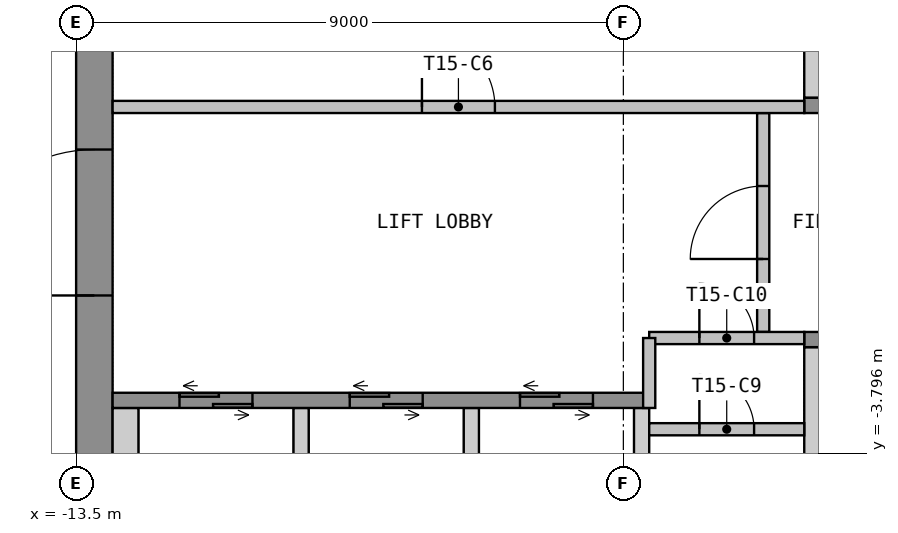
"""IFC4 building model, lengths in metres.
Left out: names, types, materials, properties, quantities, classifications, styles, units other than length and angle.
Written with IfcOpenShell. Run it as: python <this file> out.ifc"""

import sys

from ifc_helpers import new_model, si_unit, direction, frame, frame_2d, origin, place, context, subcontext, project, spatial, polyline, rectangle, outline, extrude, element, fill, save


model = new_model("IFC4")
c1 = context("Model", 3, precision=1e-05, world=origin(), true_north=direction((0.0, 1.0)))
c2 = subcontext(c1, "Body", "Model", "MODEL_VIEW")
j1 = project(units=[si_unit("LENGTHUNIT", "METRE"), si_unit("PLANEANGLEUNIT", "RADIAN")], contexts=[c1])
p1 = place(None, origin())
s1 = spatial("IfcSite", under=j1, at=p1, CompositionType="ELEMENT")
p2 = place(p1, origin())
s2 = spatial("IfcBuilding", under=s1, at=p2, CompositionType="ELEMENT")
p3 = place(p2, frame((0.0, 0.0, 207.3)))
s3 = spatial("IfcBuildingStorey", under=s2, at=p3, CompositionType="ELEMENT", Elevation=207.3)
p4 = place(p3, frame((-13.2, -10.65, 0.0), z_axis=(0.0, 0.0, 1.0), x_axis=(0.0, 1.0, 0.0)))
e1 = element("IfcWall", 1, at=p4, inside=s3, PredefinedType="SHEAR", context=c2, shape_type="SweptSolid", body=[
    extrude(rectangle(XDim=21.3, YDim=0.6, at=frame_2d((10.65, 0.0))), origin(), (0.0, 0.0, 1.0), 3.55),
])
p5 = place(p4, frame((9.45, 0.0, 0.0)))
e2 = element("IfcOpeningElement", 2, at=p5, cuts=e1, PredefinedType="OPENING", context=c2, shape_type="SweptSolid", body=[
    extrude(rectangle(XDim=2.4, YDim=2.1, at=frame_2d((1.2, 1.05))), frame((0.0, 0.31, 0.0), z_axis=(0.0, -1.0, 0.0), x_axis=(1.0, 0.0, 0.0)), (0.0, 0.0, 1.0), 0.62),
])
p6 = place(p3, origin())
e3 = element("IfcWall", 3, at=p6, inside=s3, PredefinedType="SHEAR", context=c2, shape_type="SweptSolid", body=[
    extrude(outline(polyline([(-1.525, 2.05), (-1.275, 2.05), (-1.275, 4.75), (-1.525, 4.75), (-1.525, 2.05)])), origin(), (0.0, 0.0, 1.0), 3.55),
])
p7 = place(p3, frame((-1.525, 1.925, 0.0), z_axis=(0.0, 0.0, 1.0), x_axis=(1.0, 0.0, 0.0)))
e4 = element("IfcWall", 4, at=p7, inside=s3, PredefinedType="SHEAR", context=c2, shape_type="SweptSolid", body=[
    extrude(rectangle(XDim=3.05, YDim=0.25, at=frame_2d((1.525, 0.0))), origin(), (0.0, 0.0, 1.0), 3.55),
])
p8 = place(p7, frame((0.925, 0.0, 0.0)))
e5 = element("IfcOpeningElement", 5, at=p8, cuts=e4, PredefinedType="OPENING", context=c2, shape_type="SweptSolid", body=[
    extrude(rectangle(XDim=1.2, YDim=2.1, at=frame_2d((0.6, 1.05))), frame((0.0, 0.135, 0.0), z_axis=(0.0, -1.0, 0.0), x_axis=(1.0, 0.0, 0.0)), (0.0, 0.0, 1.0), 0.27),
])
p9 = place(p3, origin())
e6 = element("IfcWall", 6, at=p9, inside=s3, PredefinedType="SHEAR", context=c2, shape_type="SweptSolid", body=[
    extrude(outline(polyline([(-12.9, -4.75), (-12.475, -4.75), (-12.475, -3.05), (-12.9, -3.05), (-12.9, -4.75)])), origin(), (0.0, 0.0, 1.0), 3.55),
])
p10 = place(p3, origin())
e7 = element("IfcWall", 7, at=p10, inside=s3, PredefinedType="SHEAR", context=c2, shape_type="SweptSolid", body=[
    extrude(outline(polyline([(-9.925, -4.75), (-9.675, -4.75), (-9.675, -3.05), (-9.925, -3.05), (-9.925, -4.75)])), origin(), (0.0, 0.0, 1.0), 3.55),
])
p11 = place(p3, origin())
e8 = element("IfcWall", 8, at=p11, inside=s3, PredefinedType="SHEAR", context=c2, shape_type="SweptSolid", body=[
    extrude(outline(polyline([(-7.125, -4.75), (-6.875, -4.75), (-6.875, -3.05), (-7.125, -3.05), (-7.125, -4.75)])), origin(), (0.0, 0.0, 1.0), 3.55),
])
p12 = place(p3, origin())
e9 = element("IfcWall", 9, at=p12, inside=s3, PredefinedType="SHEAR", context=c2, shape_type="SweptSolid", body=[
    extrude(outline(polyline([(-4.325, -4.75), (-4.075, -4.75), (-4.075, -3.05), (-4.325, -3.05), (-4.325, -4.75)])), origin(), (0.0, 0.0, 1.0), 3.55),
])
p13 = place(p3, origin())
e10 = element("IfcWall", 10, at=p13, inside=s3, PredefinedType="SHEAR", context=c2, shape_type="SweptSolid", body=[
    extrude(outline(polyline([(-1.525, -4.75), (-1.275, -4.75), (-1.275, -2.05), (-1.525, -2.05), (-1.525, -4.75)])), origin(), (0.0, 0.0, 1.0), 3.55),
])
p14 = place(p3, frame((-12.9, -2.925, 0.0), z_axis=(0.0, 0.0, 1.0), x_axis=(1.0, 0.0, 0.0)))
e11 = element("IfcWall", 11, at=p14, inside=s3, PredefinedType="SHEAR", context=c2, shape_type="SweptSolid", body=[
    extrude(rectangle(XDim=8.825, YDim=0.25, at=frame_2d((4.413, 0.0))), origin(), (0.0, 0.0, 1.0), 3.55),
])
p15 = place(p14, frame((1.1, 0.0, 0.0)))
e12 = element("IfcOpeningElement", 12, at=p15, cuts=e11, PredefinedType="OPENING", context=c2, shape_type="SweptSolid", body=[
    extrude(rectangle(XDim=1.2, YDim=2.1, at=frame_2d((0.6, 1.05))), frame((0.0, 0.135, 0.0), z_axis=(0.0, -1.0, 0.0), x_axis=(1.0, 0.0, 0.0)), (0.0, 0.0, 1.0), 0.27),
])
p16 = place(p14, frame((3.9, 0.0, 0.0)))
e13 = element("IfcOpeningElement", 13, at=p16, cuts=e11, PredefinedType="OPENING", context=c2, shape_type="SweptSolid", body=[
    extrude(rectangle(XDim=1.2, YDim=2.1, at=frame_2d((0.6, 1.05))), frame((0.0, 0.135, 0.0), z_axis=(0.0, -1.0, 0.0), x_axis=(1.0, 0.0, 0.0)), (0.0, 0.0, 1.0), 0.27),
])
p17 = place(p14, frame((6.7, 0.0, 0.0)))
e14 = element("IfcOpeningElement", 14, at=p17, cuts=e11, PredefinedType="OPENING", context=c2, shape_type="SweptSolid", body=[
    extrude(rectangle(XDim=1.2, YDim=2.1, at=frame_2d((0.6, 1.05))), frame((0.0, 0.135, 0.0), z_axis=(0.0, -1.0, 0.0), x_axis=(1.0, 0.0, 0.0)), (0.0, 0.0, 1.0), 0.27),
])
p18 = place(p3, frame((-1.525, -1.925, 0.0), z_axis=(0.0, 0.0, 1.0), x_axis=(1.0, 0.0, 0.0)))
e15 = element("IfcWall", 15, at=p18, inside=s3, PredefinedType="SHEAR", context=c2, shape_type="SweptSolid", body=[
    extrude(rectangle(XDim=14.425, YDim=0.25, at=frame_2d((7.212, 0.0))), origin(), (0.0, 0.0, 1.0), 3.55),
])
p19 = place(p18, frame((0.925, 0.0, 0.0)))
e16 = element("IfcOpeningElement", 16, at=p19, cuts=e15, PredefinedType="OPENING", context=c2, shape_type="SweptSolid", body=[
    extrude(rectangle(XDim=1.2, YDim=2.1, at=frame_2d((0.6, 1.05))), frame((0.0, 0.135, 0.0), z_axis=(0.0, -1.0, 0.0), x_axis=(1.0, 0.0, 0.0)), (0.0, 0.0, 1.0), 0.27),
])
p20 = place(p18, frame((3.725, 0.0, 0.0)))
e17 = element("IfcOpeningElement", 17, at=p20, cuts=e15, PredefinedType="OPENING", context=c2, shape_type="SweptSolid", body=[
    extrude(rectangle(XDim=1.2, YDim=2.1, at=frame_2d((0.6, 1.05))), frame((0.0, 0.135, 0.0), z_axis=(0.0, -1.0, 0.0), x_axis=(1.0, 0.0, 0.0)), (0.0, 0.0, 1.0), 0.27),
])
p21 = place(p3, frame((-2.2, -1.8, 0.0), z_axis=(0.0, 0.0, 1.0), x_axis=(0.0, 1.0, 0.0)))
e18 = element("IfcWall", 18, at=p21, inside=s3, PredefinedType="PARTITIONING", context=c2, shape_type="SweptSolid", body=[
    extrude(rectangle(XDim=3.6, YDim=0.2, at=frame_2d((1.8, 0.0))), origin(), (0.0, 0.0, 1.0), 3.55),
])
p22 = place(p21, frame((1.2, 0.0, 0.0)))
e19 = element("IfcOpeningElement", 19, at=p22, cuts=e18, PredefinedType="OPENING", context=c2, shape_type="SweptSolid", body=[
    extrude(rectangle(XDim=1.2, YDim=2.1, at=frame_2d((0.6, 1.05))), frame((0.0, 0.11, 0.0), z_axis=(0.0, -1.0, 0.0), x_axis=(1.0, 0.0, 0.0)), (0.0, 0.0, 1.0), 0.22),
])
p23 = place(p3, frame((-12.9, 1.9, 0.0), z_axis=(0.0, 0.0, 1.0), x_axis=(1.0, 0.0, 0.0)))
e20 = element("IfcWall", 20, at=p23, inside=s3, PredefinedType="PARTITIONING", context=c2, shape_type="SweptSolid", body=[
    extrude(rectangle(XDim=11.375, YDim=0.2, at=frame_2d((5.688, 0.0))), origin(), (0.0, 0.0, 1.0), 3.55),
])
p24 = place(p23, frame((5.087, 0.0, 0.0)))
e21 = element("IfcOpeningElement", 21, at=p24, cuts=e20, PredefinedType="OPENING", context=c2, shape_type="SweptSolid", body=[
    extrude(rectangle(XDim=1.2, YDim=2.1, at=frame_2d((0.6, 1.05))), frame((0.0, 0.11, 0.0), z_axis=(0.0, -1.0, 0.0), x_axis=(1.0, 0.0, 0.0)), (0.0, 0.0, 1.0), 0.22),
])
p25 = place(p3, frame((-4.075, -3.4, 0.0), z_axis=(0.0, 0.0, 1.0), x_axis=(1.0, 0.0, 0.0)))
e22 = element("IfcWall", 22, at=p25, inside=s3, PredefinedType="PARTITIONING", context=c2, shape_type="SweptSolid", body=[
    extrude(rectangle(XDim=2.55, YDim=0.2, at=frame_2d((1.275, 0.0))), origin(), (0.0, 0.0, 1.0), 3.55),
])
p26 = place(p25, frame((0.825, 0.0, 0.0)))
e23 = element("IfcOpeningElement", 23, at=p26, cuts=e22, PredefinedType="OPENING", context=c2, shape_type="SweptSolid", body=[
    extrude(rectangle(XDim=0.9, YDim=2.1, at=frame_2d((0.45, 1.05))), frame((0.0, 0.11, 0.0), z_axis=(0.0, -1.0, 0.0), x_axis=(1.0, 0.0, 0.0)), (0.0, 0.0, 1.0), 0.22),
])
p27 = place(p3, frame((-4.075, -1.9, 0.0), z_axis=(0.0, 0.0, 1.0), x_axis=(1.0, 0.0, 0.0)))
e24 = element("IfcWall", 24, at=p27, inside=s3, PredefinedType="PARTITIONING", context=c2, shape_type="SweptSolid", body=[
    extrude(rectangle(XDim=2.55, YDim=0.2, at=frame_2d((1.275, 0.0))), origin(), (0.0, 0.0, 1.0), 3.55),
])
p28 = place(p27, frame((0.825, 0.0, 0.0)))
e25 = element("IfcOpeningElement", 25, at=p28, cuts=e24, PredefinedType="OPENING", context=c2, shape_type="SweptSolid", body=[
    extrude(rectangle(XDim=0.9, YDim=2.1, at=frame_2d((0.45, 1.05))), frame((0.0, 0.11, 0.0), z_axis=(0.0, -1.0, 0.0), x_axis=(1.0, 0.0, 0.0)), (0.0, 0.0, 1.0), 0.22),
])
p29 = place(p3, frame((-4.075, -1.9, 0.0), z_axis=(0.0, 0.0, 1.0), x_axis=(0.0, -1.0, 0.0)))
e26 = element("IfcWall", 26, at=p29, inside=s3, PredefinedType="PARTITIONING", context=c2, shape_type="SweptSolid", body=[
    extrude(rectangle(XDim=1.15, YDim=0.2, at=frame_2d((0.575, 0.0))), origin(), (0.0, 0.0, 1.0), 3.55),
])
p30 = place(p5, origin())
e27 = element("IfcDoor", 27, at=p30, inside=s3, OperationType="DOUBLE_DOOR_DOUBLE_SWING", PredefinedType="DOOR", context=c2, shape_type="SweptSolid", body=[
    extrude(rectangle(XDim=2.4, YDim=2.1, at=frame_2d((1.2, 1.05))), frame((0.0, 0.025, 0.0), z_axis=(0.0, -1.0, 0.0), x_axis=(1.0, 0.0, 0.0)), (0.0, 0.0, 1.0), 0.05),
])
fill(e2, e27)
p31 = place(p15, origin())
e28 = element("IfcDoor", 28, at=p31, inside=s3, OperationType="DOUBLE_DOOR_SLIDING", PredefinedType="DOOR", context=c2, shape_type="SweptSolid", body=[
    extrude(rectangle(XDim=1.2, YDim=2.1, at=frame_2d((0.6, 1.05))), frame((0.0, 0.025, 0.0), z_axis=(0.0, -1.0, 0.0), x_axis=(1.0, 0.0, 0.0)), (0.0, 0.0, 1.0), 0.05),
])
fill(e12, e28)
p32 = place(p16, origin())
e29 = element("IfcDoor", 29, at=p32, inside=s3, OperationType="DOUBLE_DOOR_SLIDING", PredefinedType="DOOR", context=c2, shape_type="SweptSolid", body=[
    extrude(rectangle(XDim=1.2, YDim=2.1, at=frame_2d((0.6, 1.05))), frame((0.0, 0.025, 0.0), z_axis=(0.0, -1.0, 0.0), x_axis=(1.0, 0.0, 0.0)), (0.0, 0.0, 1.0), 0.05),
])
fill(e13, e29)
p33 = place(p17, origin())
e30 = element("IfcDoor", 30, at=p33, inside=s3, OperationType="DOUBLE_DOOR_SLIDING", PredefinedType="DOOR", context=c2, shape_type="SweptSolid", body=[
    extrude(rectangle(XDim=1.2, YDim=2.1, at=frame_2d((0.6, 1.05))), frame((0.0, 0.025, 0.0), z_axis=(0.0, -1.0, 0.0), x_axis=(1.0, 0.0, 0.0)), (0.0, 0.0, 1.0), 0.05),
])
fill(e14, e30)
p34 = place(p22, origin())
e31 = element("IfcDoor", 31, at=p34, inside=s3, OperationType="SINGLE_SWING_LEFT", PredefinedType="DOOR", context=c2, shape_type="SweptSolid", body=[
    extrude(rectangle(XDim=1.2, YDim=2.1, at=frame_2d((0.6, 1.05))), frame((0.0, 0.025, 0.0), z_axis=(0.0, -1.0, 0.0), x_axis=(1.0, 0.0, 0.0)), (0.0, 0.0, 1.0), 0.05),
])
fill(e19, e31)
p35 = place(p24, origin())
e32 = element("IfcDoor", 32, at=p35, inside=s3, OperationType="SINGLE_SWING_RIGHT", PredefinedType="DOOR", context=c2, shape_type="SweptSolid", body=[
    extrude(rectangle(XDim=1.2, YDim=2.1, at=frame_2d((0.6, 1.05))), frame((0.0, 0.025, 0.0), z_axis=(0.0, -1.0, 0.0), x_axis=(1.0, 0.0, 0.0)), (0.0, 0.0, 1.0), 0.05),
])
fill(e21, e32)
p36 = place(p26, origin())
e33 = element("IfcDoor", 33, at=p36, inside=s3, OperationType="SINGLE_SWING_LEFT", PredefinedType="DOOR", context=c2, shape_type="SweptSolid", body=[
    extrude(rectangle(XDim=0.9, YDim=2.1, at=frame_2d((0.45, 1.05))), frame((0.0, 0.025, 0.0), z_axis=(0.0, -1.0, 0.0), x_axis=(1.0, 0.0, 0.0)), (0.0, 0.0, 1.0), 0.05),
])
fill(e23, e33)
p37 = place(p28, origin())
e34 = element("IfcDoor", 34, at=p37, inside=s3, OperationType="SINGLE_SWING_LEFT", PredefinedType="DOOR", context=c2, shape_type="SweptSolid", body=[
    extrude(rectangle(XDim=0.9, YDim=2.1, at=frame_2d((0.45, 1.05))), frame((0.0, 0.025, 0.0), z_axis=(0.0, -1.0, 0.0), x_axis=(1.0, 0.0, 0.0)), (0.0, 0.0, 1.0), 0.05),
])
fill(e25, e34)
save(model, sys.argv[1])
